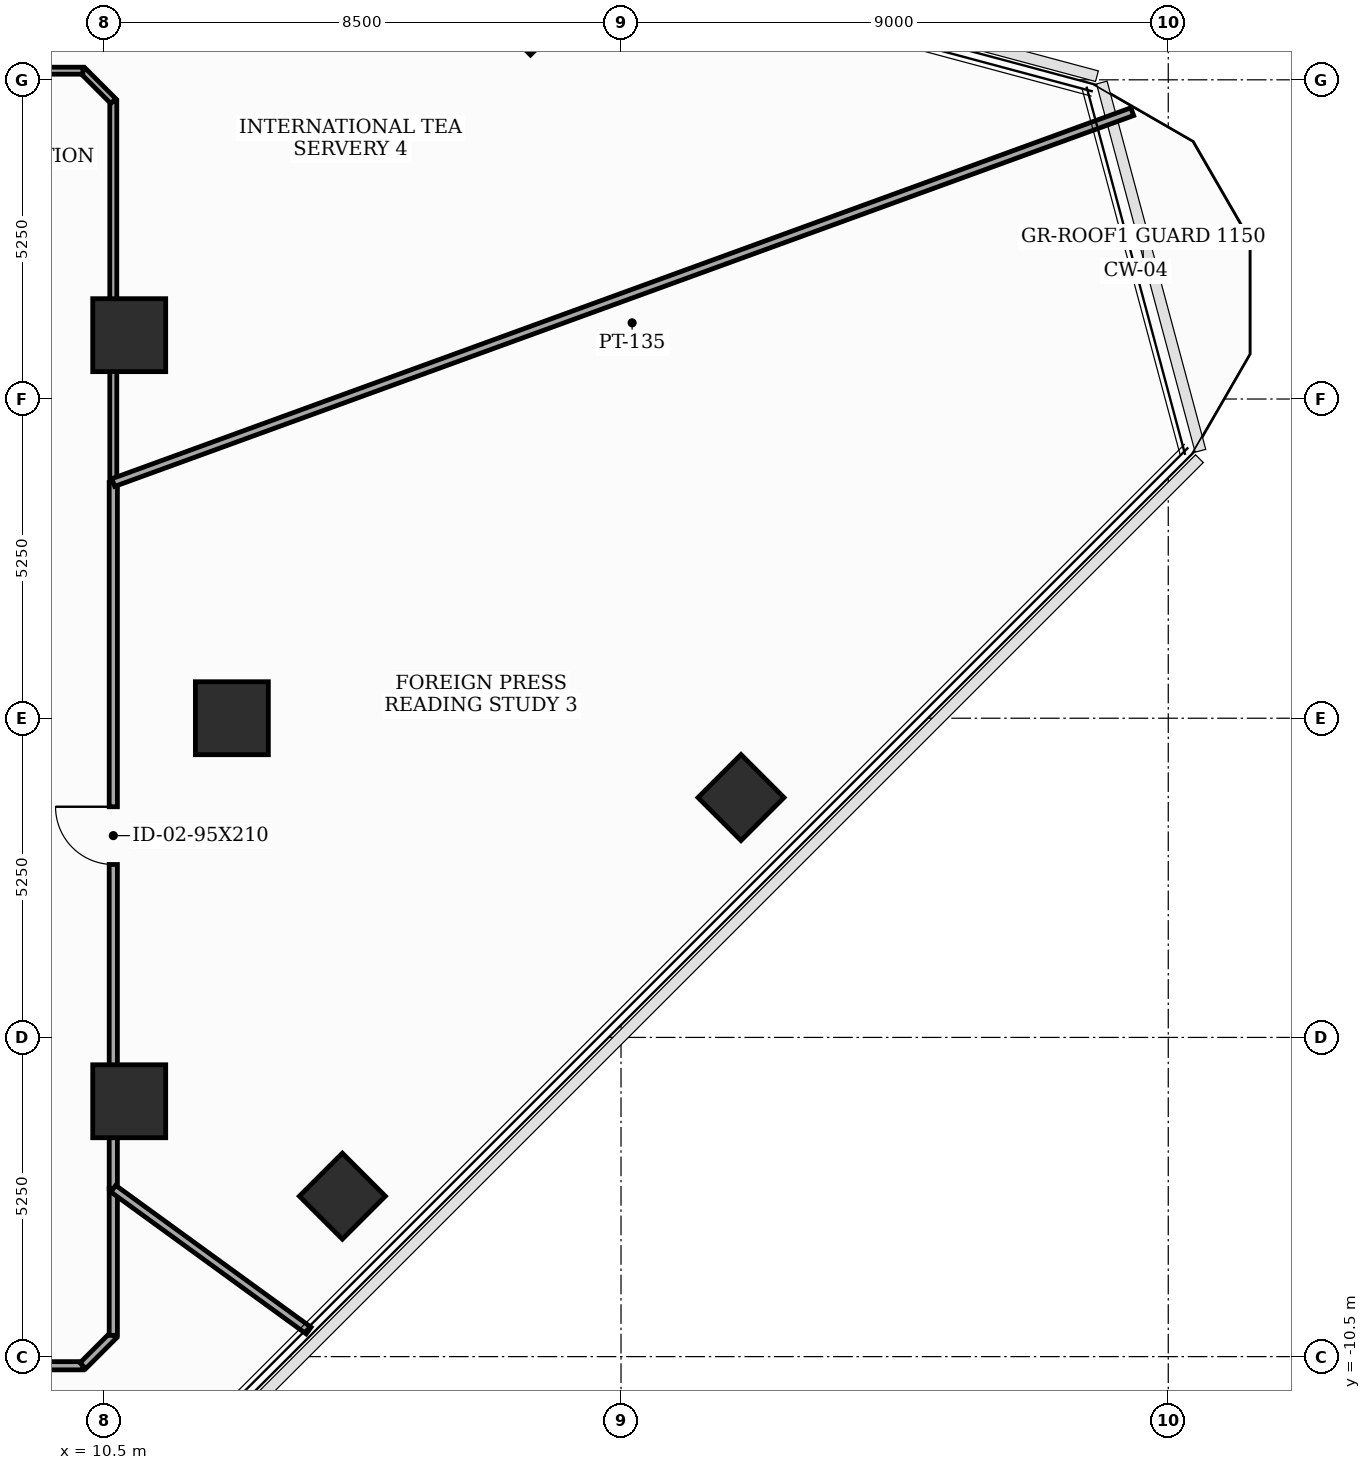
"""IFC4 building model, lengths in metres.
Left out: names, types, materials, properties, quantities, classifications, styles, units other than length and angle.
Written with IfcOpenShell. Run it as: python <this file> out.ifc"""

import sys

from ifc_helpers import new_model, si_unit, direction, frame, frame_2d, origin, origin_2d, place, context, subcontext, project, spatial, rectangle, extrude, element, fill, save


model = new_model("IFC4")
c1 = context("Model", 3, precision=1e-05, world=origin(), true_north=direction((0.0, 1.0)))
c2 = subcontext(c1, "Body", "Model", "MODEL_VIEW")
j1 = project(units=[si_unit("LENGTHUNIT", "METRE"), si_unit("PLANEANGLEUNIT", "RADIAN")], contexts=[c1])
p1 = place(None, origin())
s1 = spatial("IfcSite", under=j1, at=p1, CompositionType="ELEMENT")
p2 = place(p1, origin())
s2 = spatial("IfcBuilding", under=s1, at=p2, CompositionType="ELEMENT")
p3 = place(p2, frame((0.0, 0.0, 199.0)))
s3 = spatial("IfcBuildingStorey", under=s2, at=p3, CompositionType="ELEMENT", Elevation=199.0)
for number, where, z_axis, x_axis in (
    (1, (12.6, 0.0, 0.0), (0.0, 0.0, 1.0), (1.0, 0.0, 0.0)),
    (2, (10.912, 6.3, 0.0), (0.0, 0.0, 1.0), (1.0, 0.0, 0.0)),
    (3, (10.912, -6.3, 0.0), (0.0, 0.0, 1.0), (1.0, 0.0, 0.0)),
):
    element("IfcColumn", number, at=place(p3, frame(where, z_axis=z_axis, x_axis=x_axis)), inside=s3, PredefinedType="COLUMN", context=c2, shape_type="SweptSolid", body=[
        extrude(rectangle(XDim=1.2, YDim=1.2, at=origin_2d()), origin(), (0.0, 0.0, 1.0), 3.7),
    ])
for number, where, z_axis, x_axis in (
    (4, (14.417, -7.861, 0.0), (0.0, 0.0, 1.0), (0.707, 0.707, 0.0)),
    (5, (20.973, -1.305, 0.0), (0.0, 0.0, 1.0), (0.707, 0.707, 0.0)),
    (6, (17.511, 11.616, 0.0), (0.0, 0.0, 1.0), (0.707, 0.707, 0.0)),
):
    element("IfcColumn", number, at=place(p3, frame(where, z_axis=z_axis, x_axis=x_axis)), inside=s3, PredefinedType="COLUMN", context=c2, shape_type="SweptSolid", body=[
        extrude(rectangle(XDim=1.0, YDim=1.0, at=origin_2d()), origin(), (0.0, 0.0, 1.0), 3.7),
    ])
p4 = place(p3, frame((-4.303, -10.65, 0.0), z_axis=(0.0, 0.0, 1.0), x_axis=(1.0, 0.0, 0.0)))
e7 = element("IfcWall", 7, at=p4, inside=s3, PredefinedType="PARTITIONING", context=c2, shape_type="SweptSolid", body=[
    extrude(rectangle(XDim=14.453, YDim=0.135, at=frame_2d((7.227, 0.0))), origin(), (0.0, 0.0, 1.0), 2.885),
])
p5 = place(p4, frame((6.751, 0.0, 0.0)))
e8 = element("IfcOpeningElement", 8, at=p5, cuts=e7, PredefinedType="OPENING", context=c2, shape_type="SweptSolid", body=[
    extrude(rectangle(XDim=0.95, YDim=2.1, at=frame_2d((0.475, 1.05))), frame((0.0, 0.077, 0.0), z_axis=(0.0, -1.0, 0.0), x_axis=(1.0, 0.0, 0.0)), (0.0, 0.0, 1.0), 0.155),
])
p6 = place(p3, frame((10.15, -10.65, 0.0), z_axis=(0.0, 0.0, 1.0), x_axis=(0.707106781187, 0.707106781187, 0.0)))
e9 = element("IfcWall", 9, at=p6, inside=s3, PredefinedType="PARTITIONING", context=c2, shape_type="SweptSolid", body=[
    extrude(rectangle(XDim=0.707, YDim=0.135, at=frame_2d((0.354, 0.0))), origin(), (0.0, 0.0, 1.0), 3.5),
])
p7 = place(p3, frame((10.65, -10.15, 0.0), z_axis=(0.0, 0.0, 1.0), x_axis=(0.0, 1.0, 0.0)))
e10 = element("IfcWall", 10, at=p7, inside=s3, PredefinedType="PARTITIONING", context=c2, shape_type="SweptSolid", body=[
    extrude(rectangle(XDim=2.412, YDim=0.135, at=frame_2d((1.206, 0.0))), origin(), (0.0, 0.0, 1.0), 3.5),
])
p8 = place(p3, frame((10.65, -7.738, 0.0), z_axis=(0.0, 0.0, 1.0), x_axis=(0.0, 1.0, 0.0)))
e11 = element("IfcWall", 11, at=p8, inside=s3, PredefinedType="PARTITIONING", context=c2, shape_type="SweptSolid", body=[
    extrude(rectangle(XDim=11.614, YDim=0.135, at=frame_2d((5.807, 0.0))), origin(), (0.0, 0.0, 1.0), 2.885),
])
p9 = place(p8, frame((5.332, 0.0, 0.0)))
e12 = element("IfcOpeningElement", 12, at=p9, cuts=e11, PredefinedType="OPENING", context=c2, shape_type="SweptSolid", body=[
    extrude(rectangle(XDim=0.95, YDim=2.1, at=frame_2d((0.475, 1.05))), frame((0.0, 0.077, 0.0), z_axis=(0.0, -1.0, 0.0), x_axis=(1.0, 0.0, 0.0)), (0.0, 0.0, 1.0), 0.155),
])
p10 = place(p3, frame((10.65, 3.876, 0.0), z_axis=(0.0, 0.0, 1.0), x_axis=(0.0, 1.0, 0.0)))
e13 = element("IfcWall", 13, at=p10, inside=s3, PredefinedType="PARTITIONING", context=c2, shape_type="SweptSolid", body=[
    extrude(rectangle(XDim=6.274, YDim=0.115, at=frame_2d((3.137, 0.0))), origin(), (0.0, 0.0, 1.0), 2.885),
])
p11 = place(p3, frame((10.65, 10.15, 0.0), z_axis=(0.0, 0.0, 1.0), x_axis=(-0.707106781187, 0.707106781187, 0.0)))
e14 = element("IfcWall", 14, at=p11, inside=s3, PredefinedType="PARTITIONING", context=c2, shape_type="SweptSolid", body=[
    extrude(rectangle(XDim=0.707, YDim=0.115, at=frame_2d((0.354, 0.0))), origin(), (0.0, 0.0, 1.0), 3.5),
])
p12 = place(p3, frame((10.15, 10.65, 0.0), z_axis=(0.0, 0.0, 1.0), x_axis=(-1.0, 0.0, 0.0)))
e15 = element("IfcWall", 15, at=p12, inside=s3, PredefinedType="PARTITIONING", context=c2, shape_type="SweptSolid", body=[
    extrude(rectangle(XDim=12.414, YDim=0.115, at=frame_2d((6.207, 0.0))), origin(), (0.0, 0.0, 1.0), 2.885),
])
p13 = place(p12, frame((7.222, 0.0, 0.0)))
e16 = element("IfcOpeningElement", 16, at=p13, cuts=e15, PredefinedType="OPENING", context=c2, shape_type="SweptSolid", body=[
    extrude(rectangle(XDim=0.95, YDim=2.1, at=frame_2d((0.475, 1.05))), frame((0.0, 0.067, 0.0), z_axis=(0.0, -1.0, 0.0), x_axis=(1.0, 0.0, 0.0)), (0.0, 0.0, 1.0), 0.135),
])
p14 = place(p3, frame((13.862, -10.071, 0.0), z_axis=(0.0, 0.0, 1.0), x_axis=(-0.80911622839, 0.587648644137, 0.0)))
e17 = element("IfcWall", 17, at=p14, inside=s3, PredefinedType="PARTITIONING", context=c2, shape_type="SweptSolid", body=[
    extrude(rectangle(XDim=3.97, YDim=0.135, at=frame_2d((1.985, 0.0))), origin(), (0.0, 0.0, 1.0), 2.985),
])
p15 = place(p3, frame((27.408, 9.976, 0.0), z_axis=(0.0, 0.0, 1.0), x_axis=(-0.939687855064, -0.342033236756, 0.0)))
e18 = element("IfcWall", 18, at=p15, inside=s3, PredefinedType="PARTITIONING", context=c2, shape_type="SweptSolid", body=[
    extrude(rectangle(XDim=17.833, YDim=0.135, at=frame_2d((8.917, 0.0))), origin(), (0.0, 0.0, 1.0), 2.885),
])
p16 = place(p9, origin())
e19 = element("IfcDoor", 19, at=p16, inside=s3, OperationType="SINGLE_SWING_RIGHT", PredefinedType="DOOR", context=c2, shape_type="SweptSolid", body=[
    extrude(rectangle(XDim=0.95, YDim=2.1, at=frame_2d((0.475, 1.05))), frame((0.0, 0.025, 0.0), z_axis=(0.0, -1.0, 0.0), x_axis=(1.0, 0.0, 0.0)), (0.0, 0.0, 1.0), 0.05),
])
fill(e12, e19)
save(model, sys.argv[1])
